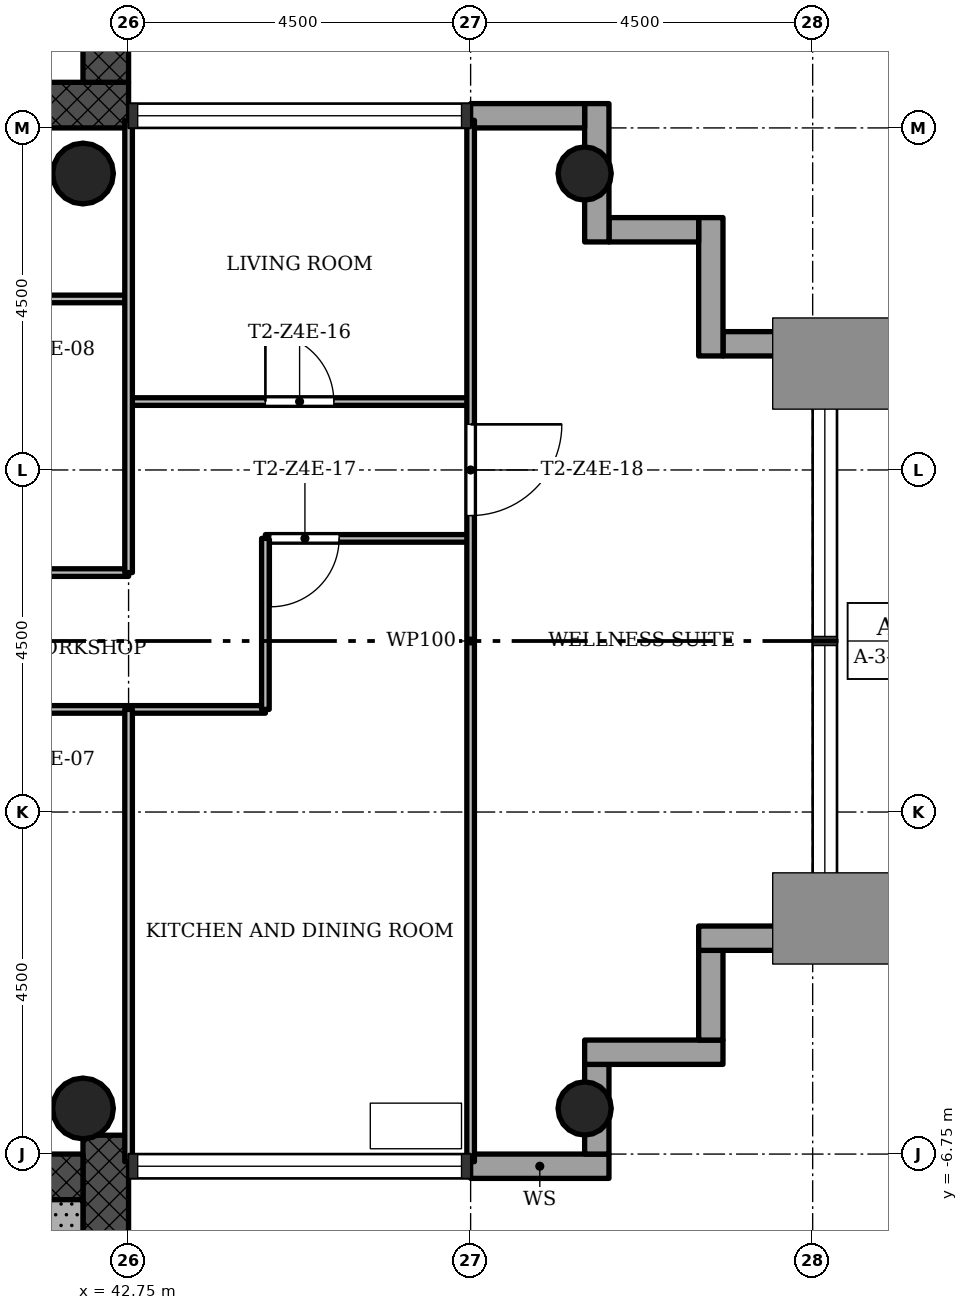
"""IFC4 building model, lengths in metres.
Left out: names, types, materials, properties, quantities, classifications, styles, units other than length and angle.
Written with IfcOpenShell. Run it as: python <this file> out.ifc"""

import sys

from ifc_helpers import new_model, si_unit, direction, frame, frame_2d, origin, origin_2d, place, context, subcontext, project, spatial, rectangle, hollow_circle, extrude, element, fill, save


model = new_model("IFC4")
c1 = context("Model", 3, precision=1e-05, world=origin(), true_north=direction((0.0, 1.0)))
c2 = subcontext(c1, "Body", "Model", "MODEL_VIEW")
j1 = project(units=[si_unit("LENGTHUNIT", "METRE"), si_unit("PLANEANGLEUNIT", "RADIAN")], contexts=[c1])
p1 = place(None, origin())
s1 = spatial("IfcSite", under=j1, at=p1, CompositionType="ELEMENT")
p2 = place(p1, origin())
s2 = spatial("IfcBuilding", under=s1, at=p2, CompositionType="ELEMENT")
p3 = place(p2, frame((0.0, 0.0, 209.6)))
s3 = spatial("IfcBuildingStorey", under=s2, at=p3, CompositionType="ELEMENT", Elevation=209.6)
p4 = place(p3, frame((29.85, 7.05, 0.0), z_axis=(0.0, 0.0, 1.0), x_axis=(1.0, 0.0, 0.0)))
e1 = element("IfcWall", 1, at=p4, inside=s3, PredefinedType="SHEAR", context=c2, shape_type="SweptSolid", body=[
    extrude(rectangle(XDim=12.9, YDim=0.6, at=frame_2d((6.45, 0.0))), origin(), (0.0, 0.0, 1.0), 3.4),
])
p5 = place(p4, frame((5.25, 0.0, 0.0)))
e2 = element("IfcOpeningElement", 2, at=p5, cuts=e1, PredefinedType="OPENING", context=c2, shape_type="SweptSolid", body=[
    extrude(rectangle(XDim=1.8, YDim=2.1, at=frame_2d((0.9, 1.05))), frame((0.0, 0.31, 0.0), z_axis=(0.0, -1.0, 0.0), x_axis=(1.0, 0.0, 0.0)), (0.0, 0.0, 1.0), 0.62),
])
p6 = place(p3, frame((42.45, 7.35, 0.0), z_axis=(0.0, 0.0, 1.0), x_axis=(0.0, 1.0, 0.0)))
e3 = element("IfcWall", 3, at=p6, inside=s3, PredefinedType="SHEAR", context=c2, shape_type="SweptSolid", body=[
    extrude(rectangle(XDim=8.4, YDim=0.6, at=frame_2d((4.2, 0.0))), origin(), (0.0, 0.0, 1.0), 3.4),
])
p7 = place(p3, frame((42.45, -15.15, 0.0), z_axis=(0.0, 0.0, 1.0), x_axis=(0.0, 1.0, 0.0)))
e4 = element("IfcWall", 4, at=p7, inside=s3, PredefinedType="SHEAR", context=c2, shape_type="SweptSolid", body=[
    extrude(rectangle(XDim=8.648, YDim=0.6, at=frame_2d((4.324, 0.0))), origin(), (0.0, 0.0, 1.0), 3.4),
])
p8 = place(p3, frame((42.15, -7.05, 0.0), z_axis=(0.0, 0.0, 1.0), x_axis=(-1.0, 0.0, 0.0)))
e5 = element("IfcWall", 5, at=p8, inside=s3, PredefinedType="SHEAR", context=c2, shape_type="SweptSolid", body=[
    extrude(rectangle(XDim=12.9, YDim=0.6, at=frame_2d((6.45, 0.0))), origin(), (0.0, 0.0, 1.0), 3.4),
])
p9 = place(p8, frame((5.25, 0.0, 0.0)))
e6 = element("IfcOpeningElement", 6, at=p9, cuts=e5, PredefinedType="OPENING", context=c2, shape_type="SweptSolid", body=[
    extrude(rectangle(XDim=1.8, YDim=2.1, at=frame_2d((0.9, 1.05))), frame((0.0, 0.31, 0.0), z_axis=(0.0, -1.0, 0.0), x_axis=(1.0, 0.0, 0.0)), (0.0, 0.0, 1.0), 0.62),
])
for number, where, z_axis, x_axis in (
    (7, (48.75, -6.15, 0.0), (0.0, 0.0, 1.0), (1.0, 0.0, 0.0)),
    (8, (48.75, 6.15, 0.0), (0.0, 0.0, 1.0), (1.0, 0.0, 0.0)),
):
    element("IfcColumn", number, at=place(p3, frame(where, z_axis=z_axis, x_axis=x_axis)), inside=s3, PredefinedType="COLUMN", context=c2, shape_type="SweptSolid", body=[
        extrude(hollow_circle(Radius=0.35, WallThickness=0.025, at=origin_2d()), origin(), (0.0, 0.0, 1.0), 3.4),
    ])
for number, where, z_axis, x_axis in (
    (9, (42.15, -6.15, 0.0), (0.0, 0.0, 1.0), (1.0, 0.0, 0.0)),
    (10, (42.15, 6.15, 0.0), (0.0, 0.0, 1.0), (1.0, 0.0, 0.0)),
):
    element("IfcColumn", number, at=place(p3, frame(where, z_axis=z_axis, x_axis=x_axis)), inside=s3, PredefinedType="COLUMN", context=c2, shape_type="SweptSolid", body=[
        extrude(hollow_circle(Radius=0.4, WallThickness=0.028, at=origin_2d()), origin(), (0.0, 0.0, 1.0), 3.4),
    ])
p10 = place(p3, frame((47.25, -6.91, -0.3), z_axis=(0.0, 0.0, 1.0), x_axis=(1.0, 0.0, 0.0)))
e11 = element("IfcWall", 11, at=p10, inside=s3, PredefinedType="STANDARD", context=c2, shape_type="SweptSolid", body=[
    extrude(rectangle(XDim=1.82, YDim=0.32, at=frame_2d((0.91, 0.0))), origin(), (0.0, 0.0, 1.0), 3.4),
])
p11 = place(p3, frame((48.91, -6.75, -0.3), z_axis=(0.0, 0.0, 1.0), x_axis=(0.0, 1.0, 0.0)))
e12 = element("IfcWall", 12, at=p11, inside=s3, PredefinedType="STANDARD", context=c2, shape_type="SweptSolid", body=[
    extrude(rectangle(XDim=1.18, YDim=0.32, at=frame_2d((0.59, 0.0))), origin(), (0.0, 0.0, 1.0), 3.4),
])
p12 = place(p3, frame((48.75, -5.41, -0.3), z_axis=(0.0, 0.0, 1.0), x_axis=(1.0, 0.0, 0.0)))
e13 = element("IfcWall", 13, at=p12, inside=s3, PredefinedType="STANDARD", context=c2, shape_type="SweptSolid", body=[
    extrude(rectangle(XDim=1.82, YDim=0.32, at=frame_2d((0.91, 0.0))), origin(), (0.0, 0.0, 1.0), 3.4),
])
p13 = place(p3, frame((50.41, -5.25, -0.3), z_axis=(0.0, 0.0, 1.0), x_axis=(0.0, 1.0, 0.0)))
e14 = element("IfcWall", 14, at=p13, inside=s3, PredefinedType="STANDARD", context=c2, shape_type="SweptSolid", body=[
    extrude(rectangle(XDim=1.18, YDim=0.32, at=frame_2d((0.59, 0.0))), origin(), (0.0, 0.0, 1.0), 3.4),
])
p14 = place(p3, frame((50.25, -3.91, -0.3), z_axis=(0.0, 0.0, 1.0), x_axis=(1.0, 0.0, 0.0)))
e15 = element("IfcWall", 15, at=p14, inside=s3, PredefinedType="STANDARD", context=c2, shape_type="SweptSolid", body=[
    extrude(rectangle(XDim=1.82, YDim=0.32, at=frame_2d((0.91, 0.0))), origin(), (0.0, 0.0, 1.0), 3.4),
])
p15 = place(p3, frame((52.07, 3.91, -0.3), z_axis=(0.0, 0.0, 1.0), x_axis=(-1.0, 0.0, 0.0)))
e16 = element("IfcWall", 16, at=p15, inside=s3, PredefinedType="STANDARD", context=c2, shape_type="SweptSolid", body=[
    extrude(rectangle(XDim=1.5, YDim=0.32, at=frame_2d((0.75, 0.0))), origin(), (0.0, 0.0, 1.0), 3.4),
])
p16 = place(p3, frame((50.41, 3.75, -0.3), z_axis=(0.0, 0.0, 1.0), x_axis=(0.0, 1.0, 0.0)))
e17 = element("IfcWall", 17, at=p16, inside=s3, PredefinedType="STANDARD", context=c2, shape_type="SweptSolid", body=[
    extrude(rectangle(XDim=1.82, YDim=0.32, at=frame_2d((0.91, 0.0))), origin(), (0.0, 0.0, 1.0), 3.4),
])
p17 = place(p3, frame((50.25, 5.41, -0.3), z_axis=(0.0, 0.0, 1.0), x_axis=(-1.0, 0.0, 0.0)))
e18 = element("IfcWall", 18, at=p17, inside=s3, PredefinedType="STANDARD", context=c2, shape_type="SweptSolid", body=[
    extrude(rectangle(XDim=1.18, YDim=0.32, at=frame_2d((0.59, 0.0))), origin(), (0.0, 0.0, 1.0), 3.4),
])
p18 = place(p3, frame((48.91, 5.25, -0.3), z_axis=(0.0, 0.0, 1.0), x_axis=(0.0, 1.0, 0.0)))
e19 = element("IfcWall", 19, at=p18, inside=s3, PredefinedType="STANDARD", context=c2, shape_type="SweptSolid", body=[
    extrude(rectangle(XDim=1.82, YDim=0.32, at=frame_2d((0.91, 0.0))), origin(), (0.0, 0.0, 1.0), 3.4),
])
p19 = place(p3, frame((48.75, 6.91, -0.3), z_axis=(0.0, 0.0, 1.0), x_axis=(-1.0, 0.0, 0.0)))
e20 = element("IfcWall", 20, at=p19, inside=s3, PredefinedType="STANDARD", context=c2, shape_type="SweptSolid", body=[
    extrude(rectangle(XDim=1.5, YDim=0.32, at=frame_2d((0.75, 0.0))), origin(), (0.0, 0.0, 1.0), 3.4),
])
p20 = place(p3, frame((44.55, -0.9, 0.0), z_axis=(0.0, 0.0, 1.0), x_axis=(-1.0, 0.0, 0.0)))
e21 = element("IfcWall", 21, at=p20, inside=s3, PredefinedType="PARTITIONING", context=c2, shape_type="SweptSolid", body=[
    extrude(rectangle(XDim=4.05, YDim=0.1, at=frame_2d((2.025, 0.0))), origin(), (0.0, 0.0, 1.0), 3.0),
])
p21 = place(p3, frame((42.75, 0.9, 0.0), z_axis=(0.0, 0.0, 1.0), x_axis=(-1.0, 0.0, 0.0)))
e22 = element("IfcWall", 22, at=p21, inside=s3, PredefinedType="PARTITIONING", context=c2, shape_type="SweptSolid", body=[
    extrude(rectangle(XDim=2.25, YDim=0.1, at=frame_2d((1.125, 0.0))), origin(), (0.0, 0.0, 1.0), 3.0),
])
p22 = place(p3, frame((47.25, 1.35, 0.0), z_axis=(0.0, 0.0, 1.0), x_axis=(-1.0, 0.0, 0.0)))
e23 = element("IfcWall", 23, at=p22, inside=s3, PredefinedType="PARTITIONING", context=c2, shape_type="SweptSolid", body=[
    extrude(rectangle(XDim=2.7, YDim=0.1, at=frame_2d((1.35, 0.0))), origin(), (0.0, 0.0, 1.0), 3.0),
])
p23 = place(p22, frame((1.73, 0.0, 0.0)))
e24 = element("IfcOpeningElement", 24, at=p23, cuts=e23, PredefinedType="OPENING", context=c2, shape_type="SweptSolid", body=[
    extrude(rectangle(XDim=0.9, YDim=2.1, at=frame_2d((0.45, 1.05))), frame((0.0, 0.06, 0.0), z_axis=(0.0, -1.0, 0.0), x_axis=(1.0, 0.0, 0.0)), (0.0, 0.0, 1.0), 0.12),
])
p24 = place(p3, frame((47.25, 3.15, 0.0), z_axis=(0.0, 0.0, 1.0), x_axis=(-1.0, 0.0, 0.0)))
e25 = element("IfcWall", 25, at=p24, inside=s3, PredefinedType="PARTITIONING", context=c2, shape_type="SweptSolid", body=[
    extrude(rectangle(XDim=4.5, YDim=0.1, at=frame_2d((2.25, 0.0))), origin(), (0.0, 0.0, 1.0), 3.0),
])
p25 = place(p24, frame((1.8, 0.0, 0.0)))
e26 = element("IfcOpeningElement", 26, at=p25, cuts=e25, PredefinedType="OPENING", context=c2, shape_type="SweptSolid", body=[
    extrude(rectangle(XDim=0.9, YDim=2.1, at=frame_2d((0.45, 1.05))), frame((0.0, 0.06, 0.0), z_axis=(0.0, -1.0, 0.0), x_axis=(1.0, 0.0, 0.0)), (0.0, 0.0, 1.0), 0.12),
])
p26 = place(p3, frame((42.75, 4.5, 0.0), z_axis=(0.0, 0.0, 1.0), x_axis=(-1.0, 0.0, 0.0)))
e27 = element("IfcWall", 27, at=p26, inside=s3, PredefinedType="PARTITIONING", context=c2, shape_type="SweptSolid", body=[
    extrude(rectangle(XDim=5.25, YDim=0.1, at=frame_2d((2.625, 0.0))), origin(), (0.0, 0.0, 1.0), 3.0),
])
p27 = place(p26, frame((3.3, 0.0, 0.0)))
e28 = element("IfcOpeningElement", 28, at=p27, cuts=e27, PredefinedType="OPENING", context=c2, shape_type="SweptSolid", body=[
    extrude(rectangle(XDim=0.9, YDim=2.1, at=frame_2d((0.45, 1.05))), frame((0.0, 0.06, 0.0), z_axis=(0.0, -1.0, 0.0), x_axis=(1.0, 0.0, 0.0)), (0.0, 0.0, 1.0), 0.12),
])
p28 = place(p3, frame((47.25, -6.85, 0.0), z_axis=(0.0, 0.0, 1.0), x_axis=(0.0, 1.0, 0.0)))
e29 = element("IfcWall", 29, at=p28, inside=s3, PredefinedType="PARTITIONING", context=c2, shape_type="SweptSolid", body=[
    extrude(rectangle(XDim=13.7, YDim=0.1, at=frame_2d((6.85, 0.0))), origin(), (0.0, 0.0, 1.0), 3.0),
])
p29 = place(p28, frame((8.5, 0.0, 0.0)))
e30 = element("IfcOpeningElement", 30, at=p29, cuts=e29, PredefinedType="OPENING", context=c2, shape_type="SweptSolid", body=[
    extrude(rectangle(XDim=1.2, YDim=2.1, at=frame_2d((0.6, 1.05))), frame((0.0, 0.06, 0.0), z_axis=(0.0, -1.0, 0.0), x_axis=(1.0, 0.0, 0.0)), (0.0, 0.0, 1.0), 0.12),
])
p30 = place(p3, frame((44.55, -0.9, 0.0), z_axis=(0.0, 0.0, 1.0), x_axis=(0.0, 1.0, 0.0)))
e31 = element("IfcWall", 31, at=p30, inside=s3, PredefinedType="PARTITIONING", context=c2, shape_type="SweptSolid", body=[
    extrude(rectangle(XDim=2.25, YDim=0.1, at=frame_2d((1.125, 0.0))), origin(), (0.0, 0.0, 1.0), 3.0),
])
for number, where, z_axis, x_axis in (
    (32, (42.75, -6.85, 0.0), (0.0, 0.0, 1.0), (0.0, 1.0, 0.0)),
    (33, (42.75, 0.9, 0.0), (0.0, 0.0, 1.0), (0.0, 1.0, 0.0)),
):
    element("IfcWall", number, at=place(p3, frame(where, z_axis=z_axis, x_axis=x_axis)), inside=s3, PredefinedType="PARTITIONING", context=c2, shape_type="SweptSolid", body=[
        extrude(rectangle(XDim=5.95, YDim=0.1, at=frame_2d((2.975, 0.0))), origin(), (0.0, 0.0, 1.0), 3.0),
    ])
p31 = place(p3, frame((37.85, -7.65, 0.0), z_axis=(0.0, 0.0, 1.0), x_axis=(1.0, 0.0, 0.0)))
e34 = element("IfcWall", 34, at=p31, inside=s3, PredefinedType="SHEAR", context=c2, shape_type="SweptSolid", body=[
    extrude(rectangle(XDim=4.3, YDim=0.6, at=frame_2d((2.15, 0.0))), origin(), (0.0, 0.0, 1.0), 3.4),
])
p32 = place(p25, origin())
e35 = element("IfcDoor", 35, at=p32, inside=s3, OperationType="SINGLE_SWING_RIGHT", PredefinedType="DOOR", context=c2, shape_type="SweptSolid", body=[
    extrude(rectangle(XDim=0.9, YDim=2.1, at=frame_2d((0.45, 1.05))), frame((0.0, 0.025, 0.0), z_axis=(0.0, -1.0, 0.0), x_axis=(1.0, 0.0, 0.0)), (0.0, 0.0, 1.0), 0.05),
])
fill(e26, e35)
p33 = place(p23, origin())
e36 = element("IfcDoor", 36, at=p33, inside=s3, OperationType="SINGLE_SWING_LEFT", PredefinedType="DOOR", context=c2, shape_type="SweptSolid", body=[
    extrude(rectangle(XDim=0.9, YDim=2.1, at=frame_2d((0.45, 1.05))), frame((0.0, 0.025, 0.0), z_axis=(0.0, -1.0, 0.0), x_axis=(1.0, 0.0, 0.0)), (0.0, 0.0, 1.0), 0.05),
])
fill(e24, e36)
p34 = place(p29, origin())
e37 = element("IfcDoor", 37, at=p34, inside=s3, OperationType="SINGLE_SWING_RIGHT", PredefinedType="DOOR", context=c2, shape_type="SweptSolid", body=[
    extrude(rectangle(XDim=1.2, YDim=2.1, at=frame_2d((0.6, 1.05))), frame((0.0, 0.025, 0.0), z_axis=(0.0, -1.0, 0.0), x_axis=(1.0, 0.0, 0.0)), (0.0, 0.0, 1.0), 0.05),
])
fill(e30, e37)
save(model, sys.argv[1])
